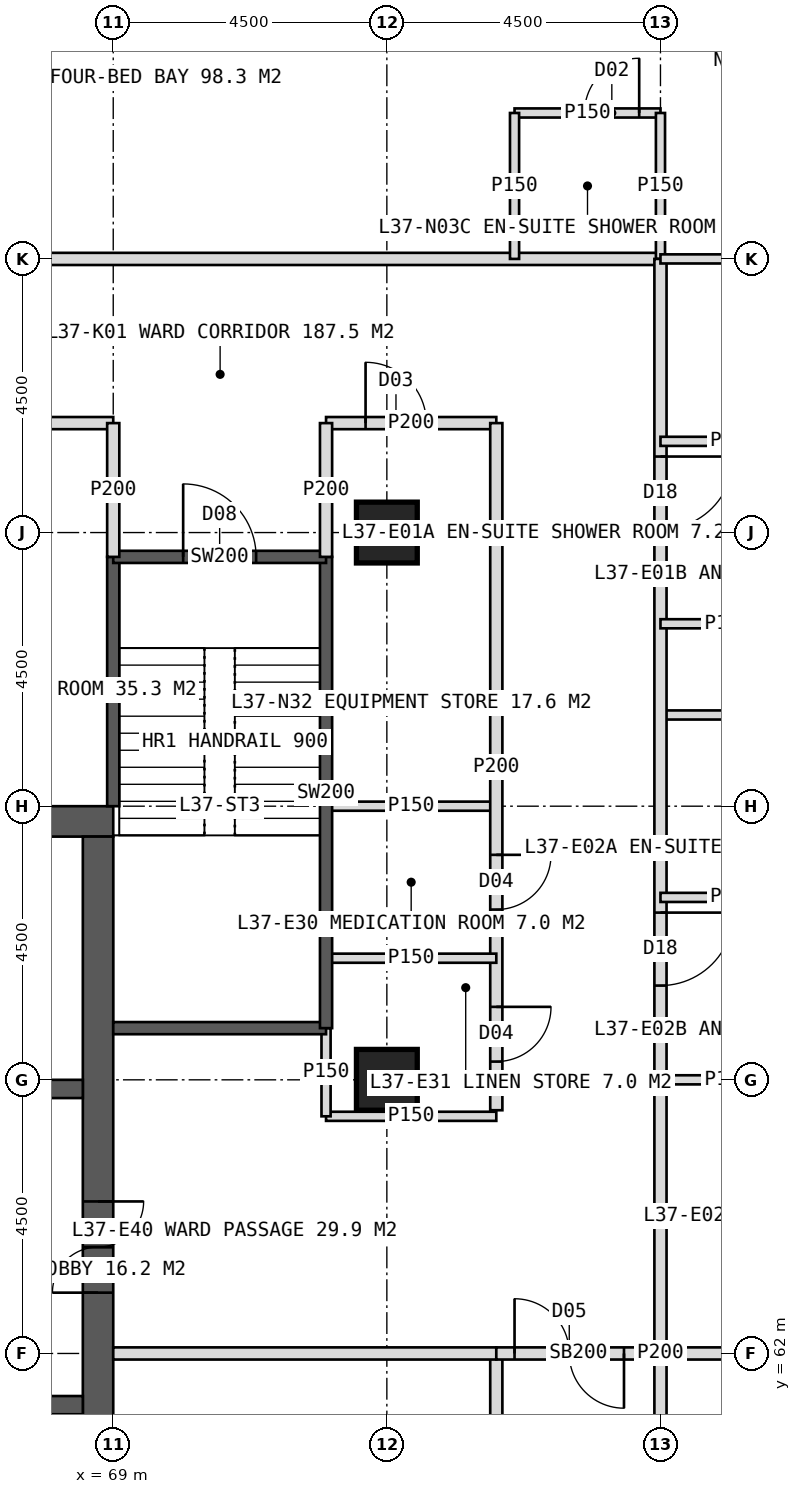
"""IFC4 building model, lengths in metres.
Left out: names, types, materials, properties, quantities, classifications, styles, units other than length and angle.
Written with IfcOpenShell. Run it as: python <this file> out.ifc"""

import sys

from ifc_helpers import new_model, si_unit, direction, frame, frame_2d, origin, origin_2d, place, context, subcontext, project, spatial, rectangle, hollow_rectangle, extrude, element, fill, save


model = new_model("IFC4")
c1 = context("Model", 3, precision=1e-05, world=origin(), true_north=direction((0.0, 1.0)))
c2 = subcontext(c1, "Body", "Model", "MODEL_VIEW")
j1 = project(units=[si_unit("LENGTHUNIT", "METRE"), si_unit("PLANEANGLEUNIT", "RADIAN")], contexts=[c1])
p1 = place(None, origin())
s1 = spatial("IfcSite", under=j1, at=p1, CompositionType="ELEMENT")
p2 = place(p1, origin())
s2 = spatial("IfcBuilding", under=s1, at=p2, CompositionType="ELEMENT")
p3 = place(p2, frame((0.0, 0.0, 156.0)))
s3 = spatial("IfcBuildingStorey", under=s2, at=p3, CompositionType="ELEMENT", Elevation=156.0)
p4 = place(p3, frame((51.0, 70.75, 0.0), z_axis=(0.0, 0.0, 1.0), x_axis=(1.0, 0.0, 0.0)))
e1 = element("IfcWall", 1, at=p4, inside=s3, PredefinedType="SHEAR", context=c2, shape_type="SweptSolid", body=[
    extrude(rectangle(XDim=18.0, YDim=0.5, at=frame_2d((9.0, 0.0))), origin(), (0.0, 0.0, 1.0), 4.0),
])
p5 = place(p4, frame((8.1, 0.0, 0.0)))
e2 = element("IfcOpeningElement", 2, at=p5, cuts=e1, PredefinedType="OPENING", context=c2, shape_type="SweptSolid", body=[
    extrude(rectangle(XDim=1.8, YDim=2.2, at=frame_2d((0.9, 1.1))), frame((0.0, 0.26, 0.0), z_axis=(0.0, -1.0, 0.0), x_axis=(1.0, 0.0, 0.0)), (0.0, 0.0, 1.0), 0.52),
])
p6 = place(p3, frame((68.75, 53.5, 0.0), z_axis=(0.0, 0.0, 1.0), x_axis=(0.0, 1.0, 0.0)))
e3 = element("IfcWall", 3, at=p6, inside=s3, PredefinedType="SHEAR", context=c2, shape_type="SweptSolid", body=[
    extrude(rectangle(XDim=17.0, YDim=0.5, at=frame_2d((8.5, 0.0))), origin(), (0.0, 0.0, 1.0), 4.0),
])
p7 = place(p6, frame((9.5, 0.0, 0.0)))
e4 = element("IfcOpeningElement", 4, at=p7, cuts=e3, PredefinedType="OPENING", context=c2, shape_type="SweptSolid", body=[
    extrude(rectangle(XDim=1.5, YDim=2.2, at=frame_2d((0.75, 1.1))), frame((0.0, 0.26, 0.0), z_axis=(0.0, -1.0, 0.0), x_axis=(1.0, 0.0, 0.0)), (0.0, 0.0, 1.0), 0.52),
])
p8 = place(p3, frame((65.2, 61.15, 0.0), z_axis=(0.0, 0.0, 1.0), x_axis=(1.0, 0.0, 0.0)))
e5 = element("IfcWall", 5, at=p8, inside=s3, PredefinedType="SHEAR", context=c2, shape_type="SweptSolid", body=[
    extrude(rectangle(XDim=3.3, YDim=0.3, at=frame_2d((1.65, 0.0))), origin(), (0.0, 0.0, 1.0), 4.0),
])
p9 = place(p8, frame((1.05, 0.0, 0.0)))
e6 = element("IfcOpeningElement", 6, at=p9, cuts=e5, PredefinedType="OPENING", context=c2, shape_type="SweptSolid", body=[
    extrude(rectangle(XDim=1.2, YDim=2.1, at=frame_2d((0.6, 1.05))), frame((0.0, 0.16, 0.0), z_axis=(0.0, -1.0, 0.0), x_axis=(1.0, 0.0, 0.0)), (0.0, 0.0, 1.0), 0.32),
])
p10 = place(p3, frame((65.2, 66.35, 0.0), z_axis=(0.0, 0.0, 1.0), x_axis=(1.0, 0.0, 0.0)))
e7 = element("IfcWall", 7, at=p10, inside=s3, PredefinedType="SHEAR", context=c2, shape_type="SweptSolid", body=[
    extrude(rectangle(XDim=3.3, YDim=0.3, at=frame_2d((1.65, 0.0))), origin(), (0.0, 0.0, 1.0), 4.0),
])
p11 = place(p10, frame((1.05, 0.0, 0.0)))
e8 = element("IfcOpeningElement", 8, at=p11, cuts=e7, PredefinedType="OPENING", context=c2, shape_type="SweptSolid", body=[
    extrude(rectangle(XDim=1.2, YDim=2.2, at=frame_2d((0.6, 1.1))), frame((0.0, 0.16, 0.0), z_axis=(0.0, -1.0, 0.0), x_axis=(1.0, 0.0, 0.0)), (0.0, 0.0, 1.0), 0.32),
])
for number, where, z_axis, x_axis in (
    (9, (73.5, 75.5, 0.0), (0.0, 0.0, 1.0), (1.0, 0.0, 0.0)),
    (10, (73.5, 66.5, 0.0), (0.0, 0.0, 1.0), (1.0, 0.0, 0.0)),
):
    element("IfcColumn", number, at=place(p3, frame(where, z_axis=z_axis, x_axis=x_axis)), inside=s3, PredefinedType="COLUMN", context=c2, shape_type="SweptSolid", body=[
        extrude(hollow_rectangle(XDim=1.0, YDim=1.0, WallThickness=0.1, at=origin_2d()), origin(), (0.0, 0.0, 1.0), 4.0),
    ])
p12 = place(p3, frame((42.0, 80.0, 0.0), z_axis=(0.0, 0.0, 1.0), x_axis=(1.0, 0.0, 0.0)))
e11 = element("IfcWall", 11, at=p12, inside=s3, PredefinedType="PARTITIONING", context=c2, shape_type="SweptSolid", body=[
    extrude(rectangle(XDim=36.0, YDim=0.2, at=frame_2d((18.0, 0.0))), origin(), (0.0, 0.0, 1.0), 3.75),
])
p13 = place(p12, frame((3.25, 0.0, 0.0)))
e12 = element("IfcOpeningElement", 12, at=p13, cuts=e11, PredefinedType="OPENING", context=c2, shape_type="SweptSolid", body=[
    extrude(rectangle(XDim=1.2, YDim=2.2, at=frame_2d((0.6, 1.1))), frame((0.0, 0.11, 0.0), z_axis=(0.0, -1.0, 0.0), x_axis=(1.0, 0.0, 0.0)), (0.0, 0.0, 1.0), 0.22),
])
p14 = place(p12, frame((13.75, 0.0, 0.0)))
e13 = element("IfcOpeningElement", 13, at=p14, cuts=e11, PredefinedType="OPENING", context=c2, shape_type="SweptSolid", body=[
    extrude(rectangle(XDim=1.0, YDim=2.1, at=frame_2d((0.5, 1.05))), frame((0.0, 0.11, 0.0), z_axis=(0.0, -1.0, 0.0), x_axis=(1.0, 0.0, 0.0)), (0.0, 0.0, 1.0), 0.22),
])
p15 = place(p12, frame((22.15, 0.0, 0.0)))
e14 = element("IfcOpeningElement", 14, at=p15, cuts=e11, PredefinedType="OPENING", context=c2, shape_type="SweptSolid", body=[
    extrude(rectangle(XDim=1.2, YDim=2.2, at=frame_2d((0.6, 1.1))), frame((0.0, 0.11, 0.0), z_axis=(0.0, -1.0, 0.0), x_axis=(1.0, 0.0, 0.0)), (0.0, 0.0, 1.0), 0.22),
])
p16 = place(p3, frame((75.6, 82.4, 0.0), z_axis=(0.0, 0.0, 1.0), x_axis=(1.0, 0.0, 0.0)))
e15 = element("IfcWall", 15, at=p16, inside=s3, PredefinedType="PARTITIONING", context=c2, shape_type="SweptSolid", body=[
    extrude(rectangle(XDim=2.4, YDim=0.15, at=frame_2d((1.2, 0.0))), origin(), (0.0, 0.0, 1.0), 3.75),
])
p17 = place(p16, frame((1.15, 0.0, 0.0)))
e16 = element("IfcOpeningElement", 16, at=p17, cuts=e15, PredefinedType="OPENING", context=c2, shape_type="SweptSolid", body=[
    extrude(rectangle(XDim=0.9, YDim=2.1, at=frame_2d((0.45, 1.05))), frame((0.0, 0.085, 0.0), z_axis=(0.0, -1.0, 0.0), x_axis=(1.0, 0.0, 0.0)), (0.0, 0.0, 1.0), 0.17),
])
for number, where, z_axis, x_axis in (
    (17, (75.6, 80.0, 0.0), (0.0, 0.0, 1.0), (0.0, 1.0, 0.0)),
    (18, (78.0, 80.0, 0.0), (0.0, 0.0, 1.0), (0.0, 1.0, 0.0)),
):
    element("IfcWall", number, at=place(p3, frame(where, z_axis=z_axis, x_axis=x_axis)), inside=s3, PredefinedType="PARTITIONING", context=c2, shape_type="SweptSolid", body=[
        extrude(rectangle(XDim=2.4, YDim=0.15, at=frame_2d((1.2, 0.0))), origin(), (0.0, 0.0, 1.0), 3.75),
    ])
p18 = place(p3, frame((62.25, 77.3, 0.0), z_axis=(0.0, 0.0, 1.0), x_axis=(1.0, 0.0, 0.0)))
e19 = element("IfcWall", 19, at=p18, inside=s3, PredefinedType="PARTITIONING", context=c2, shape_type="SweptSolid", body=[
    extrude(rectangle(XDim=6.75, YDim=0.2, at=frame_2d((3.375, 0.0))), origin(), (0.0, 0.0, 1.0), 3.75),
])
p19 = place(p18, frame((4.375, 0.0, 0.0)))
e20 = element("IfcOpeningElement", 20, at=p19, cuts=e19, PredefinedType="OPENING", context=c2, shape_type="SweptSolid", body=[
    extrude(rectangle(XDim=1.0, YDim=2.1, at=frame_2d((0.5, 1.05))), frame((0.0, 0.11, 0.0), z_axis=(0.0, -1.0, 0.0), x_axis=(1.0, 0.0, 0.0)), (0.0, 0.0, 1.0), 0.22),
])
p20 = place(p3, frame((72.5, 77.3, 0.0), z_axis=(0.0, 0.0, 1.0), x_axis=(1.0, 0.0, 0.0)))
e21 = element("IfcWall", 21, at=p20, inside=s3, PredefinedType="PARTITIONING", context=c2, shape_type="SweptSolid", body=[
    extrude(rectangle(XDim=2.8, YDim=0.2, at=frame_2d((1.4, 0.0))), origin(), (0.0, 0.0, 1.0), 3.75),
])
p21 = place(p20, frame((0.65, 0.0, 0.0)))
e22 = element("IfcOpeningElement", 22, at=p21, cuts=e21, PredefinedType="OPENING", context=c2, shape_type="SweptSolid", body=[
    extrude(rectangle(XDim=1.0, YDim=2.1, at=frame_2d((0.5, 1.05))), frame((0.0, 0.11, 0.0), z_axis=(0.0, -1.0, 0.0), x_axis=(1.0, 0.0, 0.0)), (0.0, 0.0, 1.0), 0.22),
])
p22 = place(p3, frame((78.0, 72.5, 0.0), z_axis=(0.0, 0.0, 1.0), x_axis=(1.0, 0.0, 0.0)))
e23 = element("IfcWall", 23, at=p22, inside=s3, PredefinedType="PARTITIONING", context=c2, shape_type="SweptSolid", body=[
    extrude(rectangle(XDim=5.91, YDim=0.15, at=frame_2d((2.955, 0.0))), origin(), (0.0, 0.0, 1.0), 3.75),
])
p23 = place(p3, frame((78.0, 62.0, 0.0), z_axis=(0.0, 0.0, 1.0), x_axis=(1.0, 0.0, 0.0)))
e24 = element("IfcWall", 24, at=p23, inside=s3, PredefinedType="SOLIDWALL", context=c2, shape_type="SweptSolid", body=[
    extrude(rectangle(XDim=5.91, YDim=0.2, at=frame_2d((2.955, 0.0))), origin(), (0.0, 0.0, 1.0), 2.95),
])
p24 = place(p3, frame((78.0, 80.0, 0.0), z_axis=(0.0, 0.0, 1.0), x_axis=(0.0, -1.0, 0.0)))
e25 = element("IfcWall", 25, at=p24, inside=s3, PredefinedType="PARTITIONING", context=c2, shape_type="SweptSolid", body=[
    extrude(rectangle(XDim=36.0, YDim=0.2, at=frame_2d((18.0, 0.0))), origin(), (0.0, 0.0, 1.0), 3.75),
])
p25 = place(p24, frame((3.25, 0.0, 0.0)))
e26 = element("IfcOpeningElement", 26, at=p25, cuts=e25, PredefinedType="OPENING", context=c2, shape_type="SweptSolid", body=[
    extrude(rectangle(XDim=1.2, YDim=2.2, at=frame_2d((0.6, 1.1))), frame((0.0, 0.11, 0.0), z_axis=(0.0, -1.0, 0.0), x_axis=(1.0, 0.0, 0.0)), (0.0, 0.0, 1.0), 0.22),
])
p26 = place(p24, frame((10.75, 0.0, 0.0)))
e27 = element("IfcOpeningElement", 27, at=p26, cuts=e25, PredefinedType="OPENING", context=c2, shape_type="SweptSolid", body=[
    extrude(rectangle(XDim=1.2, YDim=2.2, at=frame_2d((0.6, 1.1))), frame((0.0, 0.11, 0.0), z_axis=(0.0, -1.0, 0.0), x_axis=(1.0, 0.0, 0.0)), (0.0, 0.0, 1.0), 0.22),
])
p27 = place(p24, frame((21.25, 0.0, 0.0)))
e28 = element("IfcOpeningElement", 28, at=p27, cuts=e25, PredefinedType="OPENING", context=c2, shape_type="SweptSolid", body=[
    extrude(rectangle(XDim=1.2, YDim=2.2, at=frame_2d((0.6, 1.1))), frame((0.0, 0.11, 0.0), z_axis=(0.0, -1.0, 0.0), x_axis=(1.0, 0.0, 0.0)), (0.0, 0.0, 1.0), 0.22),
])
p28 = place(p24, frame((31.75, 0.0, 0.0)))
e29 = element("IfcOpeningElement", 29, at=p28, cuts=e25, PredefinedType="OPENING", context=c2, shape_type="SweptSolid", body=[
    extrude(rectangle(XDim=1.2, YDim=2.2, at=frame_2d((0.6, 1.1))), frame((0.0, 0.11, 0.0), z_axis=(0.0, -1.0, 0.0), x_axis=(1.0, 0.0, 0.0)), (0.0, 0.0, 1.0), 0.22),
])
p29 = place(p3, frame((78.0, 80.0, 0.0), z_axis=(0.0, 0.0, 1.0), x_axis=(1.0, 0.0, 0.0)))
e30 = element("IfcWall", 30, at=p29, inside=s3, PredefinedType="PARTITIONING", context=c2, shape_type="SweptSolid", body=[
    extrude(rectangle(XDim=5.91, YDim=0.15, at=frame_2d((2.955, 0.0))), origin(), (0.0, 0.0, 1.0), 3.75),
])
for number, where, z_axis, x_axis in (
    (31, (78.0, 77.0, 0.0), (0.0, 0.0, 1.0), (1.0, 0.0, 0.0)),
    (32, (78.0, 74.0, 0.0), (0.0, 0.0, 1.0), (1.0, 0.0, 0.0)),
    (33, (78.0, 69.5, 0.0), (0.0, 0.0, 1.0), (1.0, 0.0, 0.0)),
):
    element("IfcWall", number, at=place(p3, frame(where, z_axis=z_axis, x_axis=x_axis)), inside=s3, PredefinedType="PARTITIONING", context=c2, shape_type="SweptSolid", body=[
        extrude(rectangle(XDim=2.4, YDim=0.15, at=frame_2d((1.2, 0.0))), origin(), (0.0, 0.0, 1.0), 3.75),
    ])
p30 = place(p3, frame((78.0, 66.5, 0.0), z_axis=(0.0, 0.0, 1.0), x_axis=(1.0, 0.0, 0.0)))
e34 = element("IfcWall", 34, at=p30, inside=s3, PredefinedType="PARTITIONING", context=c2, shape_type="SweptSolid", body=[
    extrude(rectangle(XDim=2.4, YDim=0.15, at=frame_2d((1.2, 0.0))), origin(), (0.0, 0.0, 1.0), 2.95),
])
p31 = place(p3, frame((72.5, 71.0, 0.0), z_axis=(0.0, 0.0, 1.0), x_axis=(1.0, 0.0, 0.0)))
e35 = element("IfcWall", 35, at=p31, inside=s3, PredefinedType="PARTITIONING", context=c2, shape_type="SweptSolid", body=[
    extrude(rectangle(XDim=2.8, YDim=0.15, at=frame_2d((1.4, 0.0))), origin(), (0.0, 0.0, 1.0), 3.75),
])
p32 = place(p3, frame((75.3, 77.3, 0.0), z_axis=(0.0, 0.0, 1.0), x_axis=(0.0, -1.0, 0.0)))
e36 = element("IfcWall", 36, at=p32, inside=s3, PredefinedType="PARTITIONING", context=c2, shape_type="SweptSolid", body=[
    extrude(rectangle(XDim=11.3, YDim=0.2, at=frame_2d((5.65, 0.0))), origin(), (0.0, 0.0, 1.0), 3.75),
])
p33 = place(p32, frame((7.1, 0.0, 0.0)))
e37 = element("IfcOpeningElement", 37, at=p33, cuts=e36, PredefinedType="OPENING", context=c2, shape_type="SweptSolid", body=[
    extrude(rectangle(XDim=0.9, YDim=2.1, at=frame_2d((0.45, 1.05))), frame((0.0, 0.11, 0.0), z_axis=(0.0, -1.0, 0.0), x_axis=(1.0, 0.0, 0.0)), (0.0, 0.0, 1.0), 0.22),
])
p34 = place(p32, frame((9.6, 0.0, 0.0)))
e38 = element("IfcOpeningElement", 38, at=p34, cuts=e36, PredefinedType="OPENING", context=c2, shape_type="SweptSolid", body=[
    extrude(rectangle(XDim=0.9, YDim=2.1, at=frame_2d((0.45, 1.05))), frame((0.0, 0.11, 0.0), z_axis=(0.0, -1.0, 0.0), x_axis=(1.0, 0.0, 0.0)), (0.0, 0.0, 1.0), 0.22),
])
p35 = place(p3, frame((75.3, 62.0, 0.0), z_axis=(0.0, 0.0, 1.0), x_axis=(0.0, -1.0, 0.0)))
e39 = element("IfcWall", 39, at=p35, inside=s3, PredefinedType="PARTITIONING", context=c2, shape_type="SweptSolid", body=[
    extrude(rectangle(XDim=15.3, YDim=0.2, at=frame_2d((7.65, 0.0))), origin(), (0.0, 0.0, 1.0), 3.75),
])
p36 = place(p35, frame((4.0, 0.0, 0.0)))
e40 = element("IfcOpeningElement", 40, at=p36, cuts=e39, PredefinedType="OPENING", context=c2, shape_type="SweptSolid", body=[
    extrude(rectangle(XDim=1.0, YDim=2.1, at=frame_2d((0.5, 1.05))), frame((0.0, 0.11, 0.0), z_axis=(0.0, -1.0, 0.0), x_axis=(1.0, 0.0, 0.0)), (0.0, 0.0, 1.0), 0.22),
])
p37 = place(p35, frame((11.65, 0.0, 0.0)))
e41 = element("IfcOpeningElement", 41, at=p37, cuts=e39, PredefinedType="OPENING", context=c2, shape_type="SweptSolid", body=[
    extrude(rectangle(XDim=1.0, YDim=2.1, at=frame_2d((0.5, 1.05))), frame((0.0, 0.11, 0.0), z_axis=(0.0, -1.0, 0.0), x_axis=(1.0, 0.0, 0.0)), (0.0, 0.0, 1.0), 0.22),
])
p38 = place(p3, frame((72.5, 65.9, 0.0), z_axis=(0.0, 0.0, 1.0), x_axis=(1.0, 0.0, 0.0)))
e42 = element("IfcWall", 42, at=p38, inside=s3, PredefinedType="PARTITIONING", context=c2, shape_type="SweptSolid", body=[
    extrude(rectangle(XDim=2.8, YDim=0.15, at=frame_2d((1.4, 0.0))), origin(), (0.0, 0.0, 1.0), 3.75),
])
p39 = place(p3, frame((69.0, 62.0, 0.0), z_axis=(0.0, 0.0, 1.0), x_axis=(1.0, 0.0, 0.0)))
e43 = element("IfcWall", 43, at=p39, inside=s3, PredefinedType="SOLIDWALL", context=c2, shape_type="SweptSolid", body=[
    extrude(rectangle(XDim=6.3, YDim=0.2, at=frame_2d((3.15, 0.0))), origin(), (0.0, 0.0, 1.0), 2.95),
])
p40 = place(p3, frame((72.5, 68.5, 0.0), z_axis=(0.0, 0.0, 1.0), x_axis=(1.0, 0.0, 0.0)))
e44 = element("IfcWall", 44, at=p40, inside=s3, PredefinedType="PARTITIONING", context=c2, shape_type="SweptSolid", body=[
    extrude(rectangle(XDim=2.8, YDim=0.15, at=frame_2d((1.4, 0.0))), origin(), (0.0, 0.0, 1.0), 3.75),
])
p41 = place(p3, frame((75.3, 62.0, 0.0), z_axis=(0.0, 0.0, 1.0), x_axis=(1.0, 0.0, 0.0)))
e45 = element("IfcWall", 45, at=p41, inside=s3, PredefinedType="SOLIDWALL", context=c2, shape_type="SweptSolid", body=[
    extrude(rectangle(XDim=2.7, YDim=0.2, at=frame_2d((1.35, 0.0))), origin(), (0.0, 0.0, 1.0), 2.95),
])
p42 = place(p41, frame((0.3, 0.0, 0.0)))
e46 = element("IfcOpeningElement", 46, at=p42, cuts=e45, PredefinedType="OPENING", context=c2, shape_type="SweptSolid", body=[
    extrude(rectangle(XDim=1.8, YDim=2.2, at=frame_2d((0.9, 1.1))), frame((0.0, 0.11, 0.0), z_axis=(0.0, -1.0, 0.0), x_axis=(1.0, 0.0, 0.0)), (0.0, 0.0, 1.0), 0.22),
])
p43 = place(p3, frame((72.5, 65.9, 0.0), z_axis=(0.0, 0.0, 1.0), x_axis=(0.0, 1.0, 0.0)))
e47 = element("IfcWall", 47, at=p43, inside=s3, PredefinedType="PARTITIONING", context=c2, shape_type="SweptSolid", body=[
    extrude(rectangle(XDim=1.45, YDim=0.15, at=frame_2d((0.725, 0.0))), origin(), (0.0, 0.0, 1.0), 3.75),
])
p44 = place(p3, frame((69.0, 71.0, 0.0), z_axis=(0.0, 0.0, 1.0), x_axis=(0.0, 1.0, 0.0)))
e48 = element("IfcWall", 48, at=p44, inside=s3, PredefinedType="SOLIDWALL", context=c2, shape_type="SweptSolid", body=[
    extrude(rectangle(XDim=4.1, YDim=0.2, at=frame_2d((2.05, 0.0))), origin(), (0.0, 0.0, 1.0), 3.75),
])
p45 = place(p3, frame((69.0, 67.35, 0.0), z_axis=(0.0, 0.0, 1.0), x_axis=(1.0, 0.0, 0.0)))
e49 = element("IfcWall", 49, at=p45, inside=s3, PredefinedType="SOLIDWALL", context=c2, shape_type="SweptSolid", body=[
    extrude(rectangle(XDim=3.5, YDim=0.2, at=frame_2d((1.75, 0.0))), origin(), (0.0, 0.0, 1.0), 3.75),
])
p46 = place(p3, frame((72.5, 67.35, 0.0), z_axis=(0.0, 0.0, 1.0), x_axis=(0.0, 1.0, 0.0)))
e50 = element("IfcWall", 50, at=p46, inside=s3, PredefinedType="SOLIDWALL", context=c2, shape_type="SweptSolid", body=[
    extrude(rectangle(XDim=7.75, YDim=0.2, at=frame_2d((3.875, 0.0))), origin(), (0.0, 0.0, 1.0), 3.75),
])
p47 = place(p3, frame((69.0, 75.1, 0.0), z_axis=(0.0, 0.0, 1.0), x_axis=(1.0, 0.0, 0.0)))
e51 = element("IfcWall", 51, at=p47, inside=s3, PredefinedType="SOLIDWALL", context=c2, shape_type="SweptSolid", body=[
    extrude(rectangle(XDim=3.5, YDim=0.2, at=frame_2d((1.75, 0.0))), origin(), (0.0, 0.0, 1.0), 3.75),
])
p48 = place(p47, frame((1.15, 0.0, 0.0)))
e52 = element("IfcOpeningElement", 52, at=p48, cuts=e51, PredefinedType="OPENING", context=c2, shape_type="SweptSolid", body=[
    extrude(rectangle(XDim=1.2, YDim=2.1, at=frame_2d((0.6, 1.05))), frame((0.0, 0.11, 0.0), z_axis=(0.0, -1.0, 0.0), x_axis=(1.0, 0.0, 0.0)), (0.0, 0.0, 1.0), 0.22),
])
for number, where, z_axis, x_axis in (
    (53, (69.0, 75.1, 0.0), (0.0, 0.0, 1.0), (0.0, 1.0, 0.0)),
    (54, (72.5, 75.1, 0.0), (0.0, 0.0, 1.0), (0.0, 1.0, 0.0)),
):
    element("IfcWall", number, at=place(p3, frame(where, z_axis=z_axis, x_axis=x_axis)), inside=s3, PredefinedType="PARTITIONING", context=c2, shape_type="SweptSolid", body=[
        extrude(rectangle(XDim=2.2, YDim=0.2, at=frame_2d((1.1, 0.0))), origin(), (0.0, 0.0, 1.0), 3.75),
    ])
p49 = place(p17, origin())
e55 = element("IfcDoor", 55, at=p49, inside=s3, OperationType="SINGLE_SWING_RIGHT", PredefinedType="DOOR", context=c2, shape_type="SweptSolid", body=[
    extrude(rectangle(XDim=0.9, YDim=2.1, at=frame_2d((0.45, 1.05))), frame((0.0, 0.025, 0.0), z_axis=(0.0, -1.0, 0.0), x_axis=(1.0, 0.0, 0.0)), (0.0, 0.0, 1.0), 0.05),
])
fill(e16, e55)
p50 = place(p21, origin())
e56 = element("IfcDoor", 56, at=p50, inside=s3, OperationType="SINGLE_SWING_LEFT", PredefinedType="DOOR", context=c2, shape_type="SweptSolid", body=[
    extrude(rectangle(XDim=1.0, YDim=2.1, at=frame_2d((0.5, 1.05))), frame((0.0, 0.025, 0.0), z_axis=(0.0, -1.0, 0.0), x_axis=(1.0, 0.0, 0.0)), (0.0, 0.0, 1.0), 0.05),
])
fill(e22, e56)
p51 = place(p25, origin())
e57 = element("IfcDoor", 57, at=p51, inside=s3, OperationType="SINGLE_SWING_LEFT", PredefinedType="DOOR", context=c2, shape_type="SweptSolid", body=[
    extrude(rectangle(XDim=1.2, YDim=2.2, at=frame_2d((0.6, 1.1))), frame((0.0, 0.025, 0.0), z_axis=(0.0, -1.0, 0.0), x_axis=(1.0, 0.0, 0.0)), (0.0, 0.0, 1.0), 0.05),
])
fill(e26, e57)
p52 = place(p26, origin())
e58 = element("IfcDoor", 58, at=p52, inside=s3, OperationType="SINGLE_SWING_LEFT", PredefinedType="DOOR", context=c2, shape_type="SweptSolid", body=[
    extrude(rectangle(XDim=1.2, YDim=2.2, at=frame_2d((0.6, 1.1))), frame((0.0, 0.025, 0.0), z_axis=(0.0, -1.0, 0.0), x_axis=(1.0, 0.0, 0.0)), (0.0, 0.0, 1.0), 0.05),
])
fill(e27, e58)
p53 = place(p33, origin())
e59 = element("IfcDoor", 59, at=p53, inside=s3, OperationType="SINGLE_SWING_LEFT", PredefinedType="DOOR", context=c2, shape_type="SweptSolid", body=[
    extrude(rectangle(XDim=0.9, YDim=2.1, at=frame_2d((0.45, 1.05))), frame((0.0, 0.025, 0.0), z_axis=(0.0, -1.0, 0.0), x_axis=(1.0, 0.0, 0.0)), (0.0, 0.0, 1.0), 0.05),
])
fill(e37, e59)
p54 = place(p34, origin())
e60 = element("IfcDoor", 60, at=p54, inside=s3, OperationType="SINGLE_SWING_LEFT", PredefinedType="DOOR", context=c2, shape_type="SweptSolid", body=[
    extrude(rectangle(XDim=0.9, YDim=2.1, at=frame_2d((0.45, 1.05))), frame((0.0, 0.025, 0.0), z_axis=(0.0, -1.0, 0.0), x_axis=(1.0, 0.0, 0.0)), (0.0, 0.0, 1.0), 0.05),
])
fill(e38, e60)
p55 = place(p42, origin())
e61 = element("IfcDoor", 61, at=p55, inside=s3, OperationType="DOUBLE_DOOR_DOUBLE_SWING", PredefinedType="DOOR", context=c2, shape_type="SweptSolid", body=[
    extrude(rectangle(XDim=1.8, YDim=2.2, at=frame_2d((0.9, 1.1))), frame((0.0, 0.025, 0.0), z_axis=(0.0, -1.0, 0.0), x_axis=(1.0, 0.0, 0.0)), (0.0, 0.0, 1.0), 0.05),
])
fill(e46, e61)
p56 = place(p7, origin())
e62 = element("IfcDoor", 62, at=p56, inside=s3, OperationType="DOUBLE_DOOR_SINGLE_SWING", PredefinedType="DOOR", context=c2, shape_type="SweptSolid", body=[
    extrude(rectangle(XDim=1.5, YDim=2.2, at=frame_2d((0.75, 1.1))), frame((0.0, 0.025, 0.0), z_axis=(0.0, -1.0, 0.0), x_axis=(1.0, 0.0, 0.0)), (0.0, 0.0, 1.0), 0.05),
])
fill(e4, e62)
p57 = place(p48, origin())
e63 = element("IfcDoor", 63, at=p57, inside=s3, OperationType="SINGLE_SWING_LEFT", PredefinedType="DOOR", context=c2, shape_type="SweptSolid", body=[
    extrude(rectangle(XDim=1.2, YDim=2.1, at=frame_2d((0.6, 1.05))), frame((0.0, 0.025, 0.0), z_axis=(0.0, -1.0, 0.0), x_axis=(1.0, 0.0, 0.0)), (0.0, 0.0, 1.0), 0.05),
])
fill(e52, e63)
save(model, sys.argv[1])
